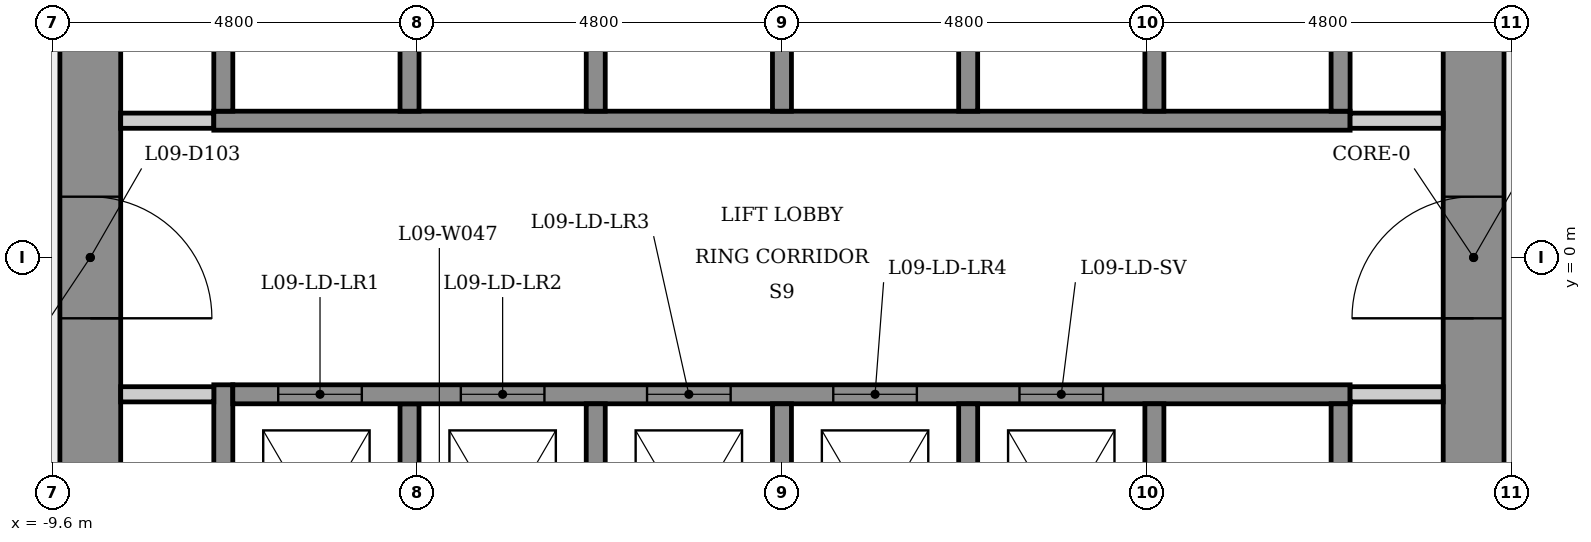
"""IFC4 building model, lengths in metres.
Left out: names, types, materials, properties, quantities, classifications, styles, units other than length and angle.
Written with IfcOpenShell. Run it as: python <this file> out.ifc"""

import sys

from ifc_helpers import new_model, si_unit, direction, frame, frame_2d, origin, place, context, subcontext, project, spatial, rectangle, extrude, element, fill, save


model = new_model("IFC4")
c1 = context("Model", 3, precision=1e-05, world=origin(), true_north=direction((0.0, 1.0)))
c2 = subcontext(c1, "Body", "Model", "MODEL_VIEW")
j1 = project(units=[si_unit("LENGTHUNIT", "METRE"), si_unit("PLANEANGLEUNIT", "RADIAN")], contexts=[c1])
p1 = place(None, origin())
s1 = spatial("IfcSite", under=j1, at=p1, CompositionType="ELEMENT")
p2 = place(p1, origin())
s2 = spatial("IfcBuilding", under=s1, at=p2, CompositionType="ELEMENT")
p3 = place(p2, frame((0.0, 0.0, 39.1)))
s3 = spatial("IfcBuildingStorey", under=s2, at=p3, CompositionType="ELEMENT", Elevation=39.1)
p4 = place(p3, frame((9.1, -5.485, 0.0), z_axis=(0.0, 0.0, 1.0), x_axis=(0.0, 1.0, 0.0)))
e1 = element("IfcWall", 1, at=p4, inside=s3, PredefinedType="SHEAR", context=c2, shape_type="SweptSolid", body=[
    extrude(rectangle(XDim=10.97, YDim=0.8, at=frame_2d((5.485, 0.0))), origin(), (0.0, 0.0, 1.0), 3.4),
])
p5 = place(p4, frame((4.685, 0.0, 0.0)))
e2 = element("IfcOpeningElement", 2, at=p5, cuts=e1, PredefinedType="OPENING", context=c2, shape_type="SweptSolid", body=[
    extrude(rectangle(XDim=1.6, YDim=2.1, at=frame_2d((0.8, 1.05))), frame((0.0, 0.41, 0.0), z_axis=(0.0, -1.0, 0.0), x_axis=(1.0, 0.0, 0.0)), (0.0, 0.0, 1.0), 0.82),
])
p6 = place(p3, frame((-9.1, 5.485, 0.0), z_axis=(0.0, 0.0, 1.0), x_axis=(0.0, -1.0, 0.0)))
e3 = element("IfcWall", 3, at=p6, inside=s3, PredefinedType="SHEAR", context=c2, shape_type="SweptSolid", body=[
    extrude(rectangle(XDim=10.97, YDim=0.8, at=frame_2d((5.485, 0.0))), origin(), (0.0, 0.0, 1.0), 3.4),
])
p7 = place(p6, frame((4.685, 0.0, 0.0)))
e4 = element("IfcOpeningElement", 4, at=p7, cuts=e3, PredefinedType="OPENING", context=c2, shape_type="SweptSolid", body=[
    extrude(rectangle(XDim=1.6, YDim=2.1, at=frame_2d((0.8, 1.05))), frame((0.0, 0.41, 0.0), z_axis=(0.0, -1.0, 0.0), x_axis=(1.0, 0.0, 0.0)), (0.0, 0.0, 1.0), 0.82),
])
p8 = place(p3, frame((-8.7, 1.8, 0.0), z_axis=(0.0, 0.0, 1.0), x_axis=(1.0, 0.0, 0.0)))
e5 = element("IfcWall", 5, at=p8, inside=s3, PredefinedType="PARTITIONING", context=c2, shape_type="SweptSolid", body=[
    extrude(rectangle(XDim=1.225, YDim=0.2, at=frame_2d((0.613, 0.0))), origin(), (0.0, 0.0, 1.0), 3.05),
])
p9 = place(p3, frame((-7.475, 1.8, 0.0), z_axis=(0.0, 0.0, 1.0), x_axis=(1.0, 0.0, 0.0)))
e6 = element("IfcWall", 6, at=p9, inside=s3, PredefinedType="SHEAR", context=c2, shape_type="SweptSolid", body=[
    extrude(rectangle(XDim=14.95, YDim=0.25, at=frame_2d((7.475, 0.0))), origin(), (0.0, 0.0, 1.0), 3.05),
])
p10 = place(p3, frame((-7.35, -5.73, 0.0), z_axis=(0.0, 0.0, 1.0), x_axis=(0.0, 1.0, 0.0)))
e7 = element("IfcWall", 7, at=p10, inside=s3, PredefinedType="SHEAR", context=c2, shape_type="SweptSolid", body=[
    extrude(rectangle(XDim=4.055, YDim=0.25, at=frame_2d((2.028, 0.0))), origin(), (0.0, 0.0, 1.0), 3.05),
])
p11 = place(p3, frame((-7.35, 1.925, 0.0), z_axis=(0.0, 0.0, 1.0), x_axis=(0.0, 1.0, 0.0)))
e8 = element("IfcWall", 8, at=p11, inside=s3, PredefinedType="SHEAR", context=c2, shape_type="SweptSolid", body=[
    extrude(rectangle(XDim=3.805, YDim=0.25, at=frame_2d((1.903, 0.0))), origin(), (0.0, 0.0, 1.0), 3.05),
])
p12 = place(p3, frame((-7.475, -1.8, 0.0), z_axis=(0.0, 0.0, 1.0), x_axis=(-1.0, 0.0, 0.0)))
e9 = element("IfcWall", 9, at=p12, inside=s3, PredefinedType="PARTITIONING", context=c2, shape_type="SweptSolid", body=[
    extrude(rectangle(XDim=1.225, YDim=0.2, at=frame_2d((0.613, 0.0))), origin(), (0.0, 0.0, 1.0), 3.05),
])
for number, where, z_axis, x_axis in (
    (10, (-4.9, -1.925, 0.0), (0.0, 0.0, 1.0), (0.0, -1.0, 0.0)),
    (11, (-4.9, 5.025, 0.0), (0.0, 0.0, 1.0), (0.0, -1.0, 0.0)),
):
    element("IfcWall", number, at=place(p3, frame(where, z_axis=z_axis, x_axis=x_axis)), inside=s3, PredefinedType="SHEAR", context=c2, shape_type="SweptSolid", body=[
        extrude(rectangle(XDim=3.1, YDim=0.25, at=frame_2d((1.55, 0.0))), origin(), (0.0, 0.0, 1.0), 3.4),
    ])
p13 = place(p3, frame((-7.225, -1.8, 0.0), z_axis=(0.0, 0.0, 1.0), x_axis=(1.0, 0.0, 0.0)))
e12 = element("IfcWall", 12, at=p13, inside=s3, PredefinedType="SHEAR", context=c2, shape_type="SweptSolid", body=[
    extrude(rectangle(XDim=14.7, YDim=0.25, at=frame_2d((7.35, 0.0))), origin(), (0.0, 0.0, 1.0), 3.05),
])
p14 = place(p13, frame((0.597, 0.0, 0.0)))
e13 = element("IfcOpeningElement", 13, at=p14, cuts=e12, PredefinedType="OPENING", context=c2, shape_type="SweptSolid", body=[
    extrude(rectangle(XDim=1.1, YDim=2.1, at=frame_2d((0.55, 1.05))), frame((0.0, 0.135, 0.0), z_axis=(0.0, -1.0, 0.0), x_axis=(1.0, 0.0, 0.0)), (0.0, 0.0, 1.0), 0.27),
])
p15 = place(p13, frame((3.0, 0.0, 0.0)))
e14 = element("IfcOpeningElement", 14, at=p15, cuts=e12, PredefinedType="OPENING", context=c2, shape_type="SweptSolid", body=[
    extrude(rectangle(XDim=1.1, YDim=2.1, at=frame_2d((0.55, 1.05))), frame((0.0, 0.135, 0.0), z_axis=(0.0, -1.0, 0.0), x_axis=(1.0, 0.0, 0.0)), (0.0, 0.0, 1.0), 0.27),
])
p16 = place(p13, frame((5.45, 0.0, 0.0)))
e15 = element("IfcOpeningElement", 15, at=p16, cuts=e12, PredefinedType="OPENING", context=c2, shape_type="SweptSolid", body=[
    extrude(rectangle(XDim=1.1, YDim=2.1, at=frame_2d((0.55, 1.05))), frame((0.0, 0.135, 0.0), z_axis=(0.0, -1.0, 0.0), x_axis=(1.0, 0.0, 0.0)), (0.0, 0.0, 1.0), 0.27),
])
p17 = place(p13, frame((7.9, 0.0, 0.0)))
e16 = element("IfcOpeningElement", 16, at=p17, cuts=e12, PredefinedType="OPENING", context=c2, shape_type="SweptSolid", body=[
    extrude(rectangle(XDim=1.1, YDim=2.1, at=frame_2d((0.55, 1.05))), frame((0.0, 0.135, 0.0), z_axis=(0.0, -1.0, 0.0), x_axis=(1.0, 0.0, 0.0)), (0.0, 0.0, 1.0), 0.27),
])
p18 = place(p13, frame((10.35, 0.0, 0.0)))
e17 = element("IfcOpeningElement", 17, at=p18, cuts=e12, PredefinedType="OPENING", context=c2, shape_type="SweptSolid", body=[
    extrude(rectangle(XDim=1.1, YDim=2.1, at=frame_2d((0.55, 1.05))), frame((0.0, 0.135, 0.0), z_axis=(0.0, -1.0, 0.0), x_axis=(1.0, 0.0, 0.0)), (0.0, 0.0, 1.0), 0.27),
])
for number, where, z_axis, x_axis in (
    (18, (-2.45, -1.925, 0.0), (0.0, 0.0, 1.0), (0.0, -1.0, 0.0)),
    (19, (-2.45, 5.025, 0.0), (0.0, 0.0, 1.0), (0.0, -1.0, 0.0)),
    (20, (0.0, -1.925, 0.0), (0.0, 0.0, 1.0), (0.0, -1.0, 0.0)),
    (21, (0.0, 5.025, 0.0), (0.0, 0.0, 1.0), (0.0, -1.0, 0.0)),
    (22, (2.45, -1.925, 0.0), (0.0, 0.0, 1.0), (0.0, -1.0, 0.0)),
    (23, (2.45, 5.025, 0.0), (0.0, 0.0, 1.0), (0.0, -1.0, 0.0)),
    (24, (4.9, -1.925, 0.0), (0.0, 0.0, 1.0), (0.0, -1.0, 0.0)),
    (25, (4.9, 5.025, 0.0), (0.0, 0.0, 1.0), (0.0, -1.0, 0.0)),
):
    element("IfcWall", number, at=place(p3, frame(where, z_axis=z_axis, x_axis=x_axis)), inside=s3, PredefinedType="SHEAR", context=c2, shape_type="SweptSolid", body=[
        extrude(rectangle(XDim=3.1, YDim=0.25, at=frame_2d((1.55, 0.0))), origin(), (0.0, 0.0, 1.0), 3.4),
    ])
p19 = place(p3, frame((7.475, 1.8, 0.0), z_axis=(0.0, 0.0, 1.0), x_axis=(1.0, 0.0, 0.0)))
e26 = element("IfcWall", 26, at=p19, inside=s3, PredefinedType="PARTITIONING", context=c2, shape_type="SweptSolid", body=[
    extrude(rectangle(XDim=1.225, YDim=0.2, at=frame_2d((0.613, 0.0))), origin(), (0.0, 0.0, 1.0), 3.05),
])
for number, where, z_axis, x_axis in (
    (27, (7.35, -1.925, 0.0), (0.0, 0.0, 1.0), (0.0, -1.0, 0.0)),
    (28, (7.35, 5.73, 0.0), (0.0, 0.0, 1.0), (0.0, -1.0, 0.0)),
):
    element("IfcWall", number, at=place(p3, frame(where, z_axis=z_axis, x_axis=x_axis)), inside=s3, PredefinedType="SHEAR", context=c2, shape_type="SweptSolid", body=[
        extrude(rectangle(XDim=3.805, YDim=0.25, at=frame_2d((1.903, 0.0))), origin(), (0.0, 0.0, 1.0), 3.05),
    ])
p20 = place(p3, frame((8.7, -1.8, 0.0), z_axis=(0.0, 0.0, 1.0), x_axis=(-1.0, 0.0, 0.0)))
e29 = element("IfcWall", 29, at=p20, inside=s3, PredefinedType="PARTITIONING", context=c2, shape_type="SweptSolid", body=[
    extrude(rectangle(XDim=1.225, YDim=0.2, at=frame_2d((0.613, 0.0))), origin(), (0.0, 0.0, 1.0), 3.05),
])
p21 = place(p14, origin())
e30 = element("IfcDoor", 30, at=p21, inside=s3, OperationType="SLIDING_TO_LEFT", PredefinedType="DOOR", context=c2, shape_type="SweptSolid", body=[
    extrude(rectangle(XDim=1.1, YDim=2.1, at=frame_2d((0.55, 1.05))), frame((0.0, 0.025, 0.0), z_axis=(0.0, -1.0, 0.0), x_axis=(1.0, 0.0, 0.0)), (0.0, 0.0, 1.0), 0.05),
])
fill(e13, e30)
p22 = place(p15, origin())
e31 = element("IfcDoor", 31, at=p22, inside=s3, OperationType="SLIDING_TO_LEFT", PredefinedType="DOOR", context=c2, shape_type="SweptSolid", body=[
    extrude(rectangle(XDim=1.1, YDim=2.1, at=frame_2d((0.55, 1.05))), frame((0.0, 0.025, 0.0), z_axis=(0.0, -1.0, 0.0), x_axis=(1.0, 0.0, 0.0)), (0.0, 0.0, 1.0), 0.05),
])
fill(e14, e31)
p23 = place(p16, origin())
e32 = element("IfcDoor", 32, at=p23, inside=s3, OperationType="SLIDING_TO_LEFT", PredefinedType="DOOR", context=c2, shape_type="SweptSolid", body=[
    extrude(rectangle(XDim=1.1, YDim=2.1, at=frame_2d((0.55, 1.05))), frame((0.0, 0.025, 0.0), z_axis=(0.0, -1.0, 0.0), x_axis=(1.0, 0.0, 0.0)), (0.0, 0.0, 1.0), 0.05),
])
fill(e15, e32)
p24 = place(p17, origin())
e33 = element("IfcDoor", 33, at=p24, inside=s3, OperationType="SLIDING_TO_LEFT", PredefinedType="DOOR", context=c2, shape_type="SweptSolid", body=[
    extrude(rectangle(XDim=1.1, YDim=2.1, at=frame_2d((0.55, 1.05))), frame((0.0, 0.025, 0.0), z_axis=(0.0, -1.0, 0.0), x_axis=(1.0, 0.0, 0.0)), (0.0, 0.0, 1.0), 0.05),
])
fill(e16, e33)
p25 = place(p18, origin())
e34 = element("IfcDoor", 34, at=p25, inside=s3, OperationType="SLIDING_TO_LEFT", PredefinedType="DOOR", context=c2, shape_type="SweptSolid", body=[
    extrude(rectangle(XDim=1.1, YDim=2.1, at=frame_2d((0.55, 1.05))), frame((0.0, 0.025, 0.0), z_axis=(0.0, -1.0, 0.0), x_axis=(1.0, 0.0, 0.0)), (0.0, 0.0, 1.0), 0.05),
])
fill(e17, e34)
p26 = place(p5, origin())
e35 = element("IfcDoor", 35, at=p26, inside=s3, OperationType="SINGLE_SWING_LEFT", PredefinedType="DOOR", context=c2, shape_type="SweptSolid", body=[
    extrude(rectangle(XDim=1.6, YDim=2.1, at=frame_2d((0.8, 1.05))), frame((0.0, 0.025, 0.0), z_axis=(0.0, -1.0, 0.0), x_axis=(1.0, 0.0, 0.0)), (0.0, 0.0, 1.0), 0.05),
])
fill(e2, e35)
p27 = place(p7, origin())
e36 = element("IfcDoor", 36, at=p27, inside=s3, OperationType="SINGLE_SWING_RIGHT", PredefinedType="DOOR", context=c2, shape_type="SweptSolid", body=[
    extrude(rectangle(XDim=1.6, YDim=2.1, at=frame_2d((0.8, 1.05))), frame((0.0, 0.025, 0.0), z_axis=(0.0, -1.0, 0.0), x_axis=(1.0, 0.0, 0.0)), (0.0, 0.0, 1.0), 0.05),
])
fill(e4, e36)
save(model, sys.argv[1])
